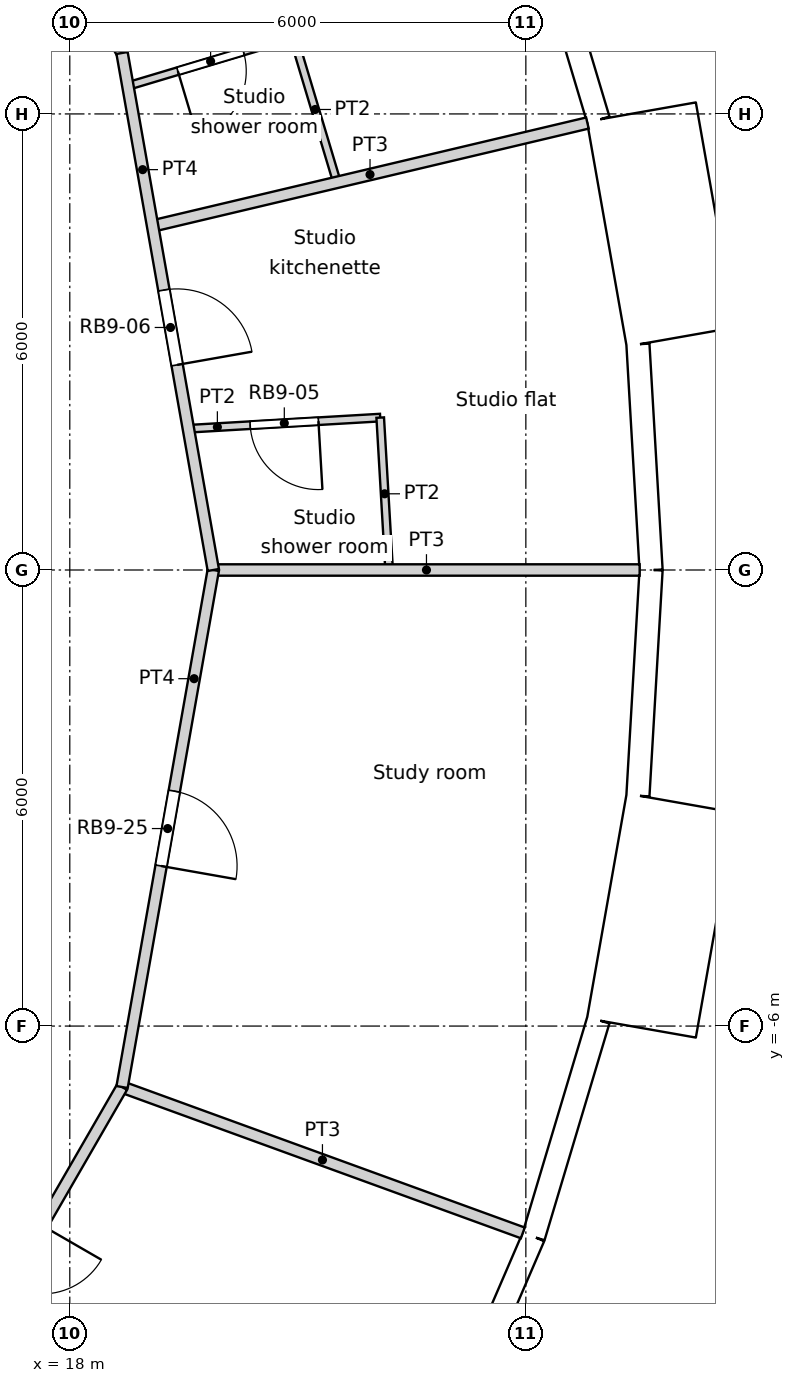
"""IFC4 building model, lengths in metres.
Left out: names, types, materials, properties, quantities, classifications, styles, units other than length and angle.
Written with IfcOpenShell. Run it as: python <this file> out.ifc"""

import sys

from ifc_helpers import new_model, si_unit, direction, frame, frame_2d, origin, origin_2d, place, context, subcontext, project, spatial, rectangle, circle, extrude, element, fill, save


model = new_model("IFC4")
c1 = context("Model", 3, precision=1e-05, world=origin(), true_north=direction((0.0, 1.0)))
c2 = subcontext(c1, "Body", "Model", "MODEL_VIEW")
j1 = project(units=[si_unit("LENGTHUNIT", "METRE"), si_unit("PLANEANGLEUNIT", "RADIAN")], contexts=[c1])
p1 = place(None, origin())
s1 = spatial("IfcSite", under=j1, at=p1, CompositionType="ELEMENT")
p2 = place(p1, origin())
s2 = spatial("IfcBuilding", under=s1, at=p2, CompositionType="ELEMENT")
p3 = place(p2, frame((0.0, 0.0, 212.4)))
s3 = spatial("IfcBuildingStorey", under=s2, at=p3, CompositionType="ELEMENT", Elevation=212.4)
for number, where, z_axis, x_axis in (
    (1, (24.548, 0.0, 0.0), (0.0, 0.0, 1.0), (1.0, 0.0, 0.0)),
    (2, (23.886, 5.661, 0.0), (0.0, 0.0, 1.0), (1.0, 0.0, 0.0)),
    (3, (23.886, -5.661, 0.0), (0.0, 0.0, 1.0), (1.0, 0.0, 0.0)),
):
    element("IfcColumn", number, at=place(p3, frame(where, z_axis=z_axis, x_axis=x_axis)), inside=s3, PredefinedType="COLUMN", context=c2, shape_type="SweptSolid", body=[
        extrude(circle(Radius=0.6, at=origin_2d()), origin(), (0.0, 0.0, 1.0), 3.6),
    ])
for number, where, z_axis, x_axis in (
    (4, (18.822, 0.0, 0.0), (0.0, 0.0, 1.0), (1.0, 0.0, 0.0)),
    (5, (17.986, 5.548, 0.0), (0.0, 0.0, 1.0), (1.0, 0.0, 0.0)),
    (6, (17.986, -5.548, 0.0), (0.0, 0.0, 1.0), (1.0, 0.0, 0.0)),
):
    element("IfcColumn", number, at=place(p3, frame(where, z_axis=z_axis, x_axis=x_axis)), inside=s3, PredefinedType="COLUMN", context=c2, shape_type="SweptSolid", body=[
        extrude(circle(Radius=0.65, at=origin_2d()), origin(), (0.0, 0.0, 1.0), 3.6),
    ])
p4 = place(p3, frame((25.647, 0.0, 0.0), z_axis=(0.0, 0.0, 1.0), x_axis=(-0.058144307138, 0.998308188661, 0.0)))
e7 = element("IfcWall", 7, at=p4, inside=s3, PredefinedType="SOLIDWALL", context=c2, shape_type="SweptSolid", body=[
    extrude(rectangle(XDim=2.973, YDim=0.3, at=frame_2d((1.486, 0.0))), origin(), (0.0, 0.0, 1.0), 3.3),
])
p5 = place(p4, frame((1.486, 0.0, 1.55)))
e8 = element("IfcOpeningElement", 8, at=p5, cuts=e7, PredefinedType="OPENING", context=c2, shape_type="SweptSolid", body=[
    extrude(circle(Radius=0.9, at=origin_2d()), frame((0.0, 0.16, 0.0), z_axis=(0.0, -1.0, 0.0), x_axis=(1.0, 0.0, 0.0)), (0.0, 0.0, 1.0), 0.32),
])
p6 = place(p3, frame((26.042, 3.069, -0.3), z_axis=(0.0, 0.0, 1.0), x_axis=(-0.173669267716, 0.984804034035, 0.0)))
e9 = element("IfcWall", 9, at=p6, inside=s3, PredefinedType="ELEMENTEDWALL", context=c2, shape_type="SweptSolid", body=[
    extrude(rectangle(XDim=3.0, YDim=1.45, at=frame_2d((1.5, 0.0))), origin(), (0.0, 0.0, 1.0), 3.6),
])
p7 = place(p6, frame((1.5, 0.0, 1.85)))
e10 = element("IfcOpeningElement", 10, at=p7, cuts=e9, PredefinedType="OPENING", context=c2, shape_type="SweptSolid", body=[
    extrude(circle(Radius=0.9, at=origin_2d()), frame((0.0, 0.735, 0.0), z_axis=(0.0, -1.0, 0.0), x_axis=(1.0, 0.0, 0.0)), (0.0, 0.0, 1.0), 1.47),
])
p8 = place(p3, frame((24.953, 5.924, 0.0), z_axis=(0.0, 0.0, 1.0), x_axis=(-0.286782750849, 0.957995643944, 0.0)))
e11 = element("IfcWall", 11, at=p8, inside=s3, PredefinedType="SOLIDWALL", context=c2, shape_type="SweptSolid", body=[
    extrude(rectangle(XDim=2.973, YDim=0.3, at=frame_2d((1.486, 0.0))), origin(), (0.0, 0.0, 1.0), 3.3),
])
p9 = place(p8, frame((1.486, 0.0, 1.55)))
e12 = element("IfcOpeningElement", 12, at=p9, cuts=e11, PredefinedType="OPENING", context=c2, shape_type="SweptSolid", body=[
    extrude(circle(Radius=0.9, at=origin_2d()), frame((0.0, 0.16, 0.0), z_axis=(0.0, -1.0, 0.0), x_axis=(1.0, 0.0, 0.0)), (0.0, 0.0, 1.0), 0.32),
])
p10 = place(p3, frame((22.923, -11.502, 0.0), z_axis=(0.0, 0.0, 1.0), x_axis=(0.396148129016, 0.918186614952, 0.0)))
e13 = element("IfcWall", 13, at=p10, inside=s3, PredefinedType="SOLIDWALL", context=c2, shape_type="SweptSolid", body=[
    extrude(rectangle(XDim=2.973, YDim=0.3, at=frame_2d((1.486, 0.0))), origin(), (0.0, 0.0, 1.0), 3.3),
])
p11 = place(p10, frame((1.486, 0.0, 1.55)))
e14 = element("IfcOpeningElement", 14, at=p11, cuts=e13, PredefinedType="OPENING", context=c2, shape_type="SweptSolid", body=[
    extrude(circle(Radius=0.9, at=origin_2d()), frame((0.0, 0.16, 0.0), z_axis=(0.0, -1.0, 0.0), x_axis=(1.0, 0.0, 0.0)), (0.0, 0.0, 1.0), 0.32),
])
p12 = place(p3, frame((24.101, -8.772, 0.0), z_axis=(0.0, 0.0, 1.0), x_axis=(0.286782750849, 0.957995643944, 0.0)))
e15 = element("IfcWall", 15, at=p12, inside=s3, PredefinedType="SOLIDWALL", context=c2, shape_type="SweptSolid", body=[
    extrude(rectangle(XDim=2.973, YDim=0.3, at=frame_2d((1.486, 0.0))), origin(), (0.0, 0.0, 1.0), 3.3),
])
p13 = place(p12, frame((1.486, 0.0, 1.55)))
e16 = element("IfcOpeningElement", 16, at=p13, cuts=e15, PredefinedType="OPENING", context=c2, shape_type="SweptSolid", body=[
    extrude(circle(Radius=0.9, at=origin_2d()), frame((0.0, 0.16, 0.0), z_axis=(0.0, -1.0, 0.0), x_axis=(1.0, 0.0, 0.0)), (0.0, 0.0, 1.0), 0.32),
])
p14 = place(p3, frame((25.521, -6.023, -0.3), z_axis=(0.0, 0.0, 1.0), x_axis=(0.173669267716, 0.984804034035, 0.0)))
e17 = element("IfcWall", 17, at=p14, inside=s3, PredefinedType="ELEMENTEDWALL", context=c2, shape_type="SweptSolid", body=[
    extrude(rectangle(XDim=3.0, YDim=1.45, at=frame_2d((1.5, 0.0))), origin(), (0.0, 0.0, 1.0), 3.6),
])
p15 = place(p14, frame((1.5, 0.0, 1.85)))
e18 = element("IfcOpeningElement", 18, at=p15, cuts=e17, PredefinedType="OPENING", context=c2, shape_type="SweptSolid", body=[
    extrude(circle(Radius=0.9, at=origin_2d()), frame((0.0, 0.735, 0.0), z_axis=(0.0, -1.0, 0.0), x_axis=(1.0, 0.0, 0.0)), (0.0, 0.0, 1.0), 1.47),
])
p16 = place(p3, frame((25.475, -2.968, 0.0), z_axis=(0.0, 0.0, 1.0), x_axis=(0.058144307138, 0.998308188661, 0.0)))
e19 = element("IfcWall", 19, at=p16, inside=s3, PredefinedType="SOLIDWALL", context=c2, shape_type="SweptSolid", body=[
    extrude(rectangle(XDim=2.973, YDim=0.3, at=frame_2d((1.486, 0.0))), origin(), (0.0, 0.0, 1.0), 3.3),
])
p17 = place(p16, frame((1.486, 0.0, 1.55)))
e20 = element("IfcOpeningElement", 20, at=p17, cuts=e19, PredefinedType="OPENING", context=c2, shape_type="SweptSolid", body=[
    extrude(circle(Radius=0.9, at=origin_2d()), frame((0.0, 0.16, 0.0), z_axis=(0.0, -1.0, 0.0), x_axis=(1.0, 0.0, 0.0)), (0.0, 0.0, 1.0), 0.32),
])
p18 = place(p3, frame((18.688, 6.802, 0.0), z_axis=(0.0, 0.0, 1.0), x_axis=(0.173831710537, -0.984775373581, 0.0)))
e21 = element("IfcWall", 21, at=p18, inside=s3, PredefinedType="PARTITIONING", context=c2, shape_type="SweptSolid", body=[
    extrude(rectangle(XDim=6.907, YDim=0.15, at=frame_2d((3.454, 0.0))), origin(), (0.0, 0.0, 1.0), 3.15),
])
p19 = place(p18, frame((3.167, 0.0, 0.0)))
e22 = element("IfcOpeningElement", 22, at=p19, cuts=e21, PredefinedType="OPENING", context=c2, shape_type="SweptSolid", body=[
    extrude(rectangle(XDim=1.0, YDim=2.1, at=frame_2d((0.5, 1.05))), frame((0.0, 0.075, 0.0), z_axis=(0.0, -1.0, 0.0), x_axis=(1.0, 0.0, 0.0)), (0.0, 0.0, 1.0), 0.15),
])
p20 = place(p3, frame((15.235, 12.784, 0.0), z_axis=(0.0, 0.0, 1.0), x_axis=(0.499940714931, -0.86605962933, 0.0)))
e23 = element("IfcWall", 23, at=p20, inside=s3, PredefinedType="PARTITIONING", context=c2, shape_type="SweptSolid", body=[
    extrude(rectangle(XDim=6.907, YDim=0.15, at=frame_2d((3.454, 0.0))), origin(), (0.0, 0.0, 1.0), 3.15),
])
p21 = place(p20, frame((5.249, 0.0, 0.0)))
e24 = element("IfcOpeningElement", 24, at=p21, cuts=e23, PredefinedType="OPENING", context=c2, shape_type="SweptSolid", body=[
    extrude(rectangle(XDim=1.0, YDim=2.1, at=frame_2d((0.5, 1.05))), frame((0.0, 0.075, 0.0), z_axis=(0.0, -1.0, 0.0), x_axis=(1.0, 0.0, 0.0)), (0.0, 0.0, 1.0), 0.15),
])
p22 = place(p20, frame((3.041, 0.0, 0.0)))
e25 = element("IfcOpeningElement", 25, at=p22, cuts=e23, PredefinedType="OPENING", context=c2, shape_type="SweptSolid", body=[
    extrude(rectangle(XDim=1.0, YDim=2.1, at=frame_2d((0.5, 1.05))), frame((0.0, 0.075, 0.0), z_axis=(0.0, -1.0, 0.0), x_axis=(1.0, 0.0, 0.0)), (0.0, 0.0, 1.0), 0.15),
])
p23 = place(p3, frame((15.235, -12.784, 0.0), z_axis=(0.0, 0.0, 1.0), x_axis=(0.499914202267, 0.866074933462, 0.0)))
e26 = element("IfcWall", 26, at=p23, inside=s3, PredefinedType="PARTITIONING", context=c2, shape_type="SweptSolid", body=[
    extrude(rectangle(XDim=6.907, YDim=0.15, at=frame_2d((3.454, 0.0))), origin(), (0.0, 0.0, 1.0), 3.15),
])
p24 = place(p23, frame((3.003, 0.0, 0.0)))
e27 = element("IfcOpeningElement", 27, at=p24, cuts=e26, PredefinedType="OPENING", context=c2, shape_type="SweptSolid", body=[
    extrude(rectangle(XDim=1.8, YDim=2.1, at=frame_2d((0.9, 1.05))), frame((0.0, 0.075, 0.0), z_axis=(0.0, -1.0, 0.0), x_axis=(1.0, 0.0, 0.0)), (0.0, 0.0, 1.0), 0.15),
])
p25 = place(p3, frame((18.688, -6.802, 0.0), z_axis=(0.0, 0.0, 1.0), x_axis=(0.173728873845, 0.98479352069, 0.0)))
e28 = element("IfcWall", 28, at=p25, inside=s3, PredefinedType="PARTITIONING", context=c2, shape_type="SweptSolid", body=[
    extrude(rectangle(XDim=6.907, YDim=0.15, at=frame_2d((3.454, 0.0))), origin(), (0.0, 0.0, 1.0), 3.15),
])
p26 = place(p25, frame((2.953, 0.0, 0.0)))
e29 = element("IfcOpeningElement", 29, at=p26, cuts=e28, PredefinedType="OPENING", context=c2, shape_type="SweptSolid", body=[
    extrude(rectangle(XDim=1.0, YDim=2.04, at=frame_2d((0.5, 1.02))), frame((0.0, 0.075, 0.0), z_axis=(0.0, -1.0, 0.0), x_axis=(1.0, 0.0, 0.0)), (0.0, 0.0, 1.0), 0.15),
])
p27 = place(p3, frame((22.084, 2.005, 0.0), z_axis=(0.0, 0.0, 1.0), x_axis=(0.058230299749, -0.998303176491, 0.0)))
e30 = element("IfcWall", 30, at=p27, inside=s3, PredefinedType="PARTITIONING", context=c2, shape_type="SweptSolid", body=[
    extrude(rectangle(XDim=2.008, YDim=0.1, at=frame_2d((1.004, 0.0))), origin(), (0.0, 0.0, 1.0), 3.15),
])
p28 = place(p3, frame((19.56, 1.858, 0.0), z_axis=(0.0, 0.0, 1.0), x_axis=(0.998308830473, 0.05813328651, 0.0)))
e31 = element("IfcWall", 31, at=p28, inside=s3, PredefinedType="PARTITIONING", context=c2, shape_type="SweptSolid", body=[
    extrude(rectangle(XDim=2.528, YDim=0.1, at=frame_2d((1.264, 0.0))), origin(), (0.0, 0.0, 1.0), 3.15),
])
p29 = place(p28, frame((0.814, 0.0, 0.0)))
e32 = element("IfcOpeningElement", 32, at=p29, cuts=e31, PredefinedType="OPENING", context=c2, shape_type="SweptSolid", body=[
    extrude(rectangle(XDim=0.9, YDim=2.04, at=frame_2d((0.45, 1.02))), frame((0.0, 0.05, 0.0), z_axis=(0.0, -1.0, 0.0), x_axis=(1.0, 0.0, 0.0)), (0.0, 0.0, 1.0), 0.1),
])
p30 = place(p3, frame((19.09, 4.525, 0.0), z_axis=(0.0, 0.0, 1.0), x_axis=(0.973093766115, 0.230409466707, 0.0)))
e33 = element("IfcWall", 33, at=p30, inside=s3, PredefinedType="PARTITIONING", context=c2, shape_type="SweptSolid", body=[
    extrude(rectangle(XDim=5.879, YDim=0.15, at=frame_2d((2.939, 0.0))), origin(), (0.0, 0.0, 1.0), 3.15),
])
p31 = place(p3, frame((19.888, 0.0, 0.0), z_axis=(0.0, 0.0, 1.0), x_axis=(1.0, 0.0, 0.0)))
e34 = element("IfcWall", 34, at=p31, inside=s3, PredefinedType="PARTITIONING", context=c2, shape_type="SweptSolid", body=[
    extrude(rectangle(XDim=5.609, YDim=0.15, at=frame_2d((2.805, 0.0))), origin(), (0.0, 0.0, 1.0), 3.15),
])
p32 = place(p3, frame((20.941, 7.018, 0.0), z_axis=(0.0, 0.0, 1.0), x_axis=(0.287124264191, -0.957893343182, 0.0)))
e35 = element("IfcWall", 35, at=p32, inside=s3, PredefinedType="PARTITIONING", context=c2, shape_type="SweptSolid", body=[
    extrude(rectangle(XDim=2.003, YDim=0.1, at=frame_2d((1.002, 0.0))), origin(), (0.0, 0.0, 1.0), 3.15),
])
p33 = place(p3, frame((18.765, 6.367, 0.0), z_axis=(0.0, 0.0, 1.0), x_axis=(0.958030169919, 0.286667391807, 0.0)))
e36 = element("IfcWall", 36, at=p33, inside=s3, PredefinedType="PARTITIONING", context=c2, shape_type="SweptSolid", body=[
    extrude(rectangle(XDim=2.271, YDim=0.1, at=frame_2d((1.136, 0.0))), origin(), (0.0, 0.0, 1.0), 3.15),
])
p34 = place(p33, frame((0.685, 0.0, 0.0)))
e37 = element("IfcOpeningElement", 37, at=p34, cuts=e36, PredefinedType="OPENING", context=c2, shape_type="SweptSolid", body=[
    extrude(rectangle(XDim=0.9, YDim=2.04, at=frame_2d((0.45, 1.02))), frame((0.0, 0.05, 0.0), z_axis=(0.0, -1.0, 0.0), x_axis=(1.0, 0.0, 0.0)), (0.0, 0.0, 1.0), 0.1),
])
p35 = place(p3, frame((18.688, -6.802, 0.0), z_axis=(0.0, 0.0, 1.0), x_axis=(0.939686652043, -0.342036541866, 0.0)))
e38 = element("IfcWall", 38, at=p35, inside=s3, PredefinedType="PARTITIONING", context=c2, shape_type="SweptSolid", body=[
    extrude(rectangle(XDim=5.61, YDim=0.15, at=frame_2d((2.805, 0.0))), origin(), (0.0, 0.0, 1.0), 3.15),
])
p36 = place(p5, origin())
e39 = element("IfcWindow", 39, at=p36, inside=s3, PartitioningType="SINGLE_PANEL", PredefinedType="WINDOW", context=c2, shape_type="SweptSolid", body=[
    extrude(circle(Radius=0.9, at=origin_2d()), frame((0.0, 0.12, 0.0), z_axis=(0.0, -1.0, 0.0), x_axis=(1.0, 0.0, 0.0)), (0.0, 0.0, 1.0), 0.1),
])
fill(e8, e39)
p37 = place(p7, origin())
e40 = element("IfcWindow", 40, at=p37, inside=s3, PartitioningType="SINGLE_PANEL", PredefinedType="WINDOW", context=c2, shape_type="SweptSolid", body=[
    extrude(circle(Radius=0.9, at=origin_2d()), frame((0.0, 0.695, 0.0), z_axis=(0.0, -1.0, 0.0), x_axis=(1.0, 0.0, 0.0)), (0.0, 0.0, 1.0), 0.1),
])
fill(e10, e40)
p38 = place(p9, origin())
e41 = element("IfcWindow", 41, at=p38, inside=s3, PartitioningType="SINGLE_PANEL", PredefinedType="WINDOW", context=c2, shape_type="SweptSolid", body=[
    extrude(circle(Radius=0.9, at=origin_2d()), frame((0.0, 0.12, 0.0), z_axis=(0.0, -1.0, 0.0), x_axis=(1.0, 0.0, 0.0)), (0.0, 0.0, 1.0), 0.1),
])
fill(e12, e41)
p39 = place(p11, origin())
e42 = element("IfcWindow", 42, at=p39, inside=s3, PartitioningType="SINGLE_PANEL", PredefinedType="WINDOW", context=c2, shape_type="SweptSolid", body=[
    extrude(circle(Radius=0.9, at=origin_2d()), frame((0.0, 0.12, 0.0), z_axis=(0.0, -1.0, 0.0), x_axis=(1.0, 0.0, 0.0)), (0.0, 0.0, 1.0), 0.1),
])
fill(e14, e42)
p40 = place(p13, origin())
e43 = element("IfcWindow", 43, at=p40, inside=s3, PartitioningType="SINGLE_PANEL", PredefinedType="WINDOW", context=c2, shape_type="SweptSolid", body=[
    extrude(circle(Radius=0.9, at=origin_2d()), frame((0.0, 0.12, 0.0), z_axis=(0.0, -1.0, 0.0), x_axis=(1.0, 0.0, 0.0)), (0.0, 0.0, 1.0), 0.1),
])
fill(e16, e43)
p41 = place(p15, origin())
e44 = element("IfcWindow", 44, at=p41, inside=s3, PartitioningType="SINGLE_PANEL", PredefinedType="WINDOW", context=c2, shape_type="SweptSolid", body=[
    extrude(circle(Radius=0.9, at=origin_2d()), frame((0.0, 0.695, 0.0), z_axis=(0.0, -1.0, 0.0), x_axis=(1.0, 0.0, 0.0)), (0.0, 0.0, 1.0), 0.1),
])
fill(e18, e44)
p42 = place(p17, origin())
e45 = element("IfcWindow", 45, at=p42, inside=s3, PartitioningType="SINGLE_PANEL", PredefinedType="WINDOW", context=c2, shape_type="SweptSolid", body=[
    extrude(circle(Radius=0.9, at=origin_2d()), frame((0.0, 0.12, 0.0), z_axis=(0.0, -1.0, 0.0), x_axis=(1.0, 0.0, 0.0)), (0.0, 0.0, 1.0), 0.1),
])
fill(e20, e45)
p43 = place(p29, origin())
e46 = element("IfcDoor", 46, at=p43, inside=s3, OperationType="SINGLE_SWING_LEFT", PredefinedType="DOOR", context=c2, shape_type="SweptSolid", body=[
    extrude(rectangle(XDim=0.9, YDim=2.04, at=frame_2d((0.45, 1.02))), frame((0.0, 0.025, 0.0), z_axis=(0.0, -1.0, 0.0), x_axis=(1.0, 0.0, 0.0)), (0.0, 0.0, 1.0), 0.05),
])
fill(e32, e46)
p44 = place(p19, origin())
e47 = element("IfcDoor", 47, at=p44, inside=s3, OperationType="SINGLE_SWING_RIGHT", PredefinedType="DOOR", context=c2, shape_type="SweptSolid", body=[
    extrude(rectangle(XDim=1.0, YDim=2.1, at=frame_2d((0.5, 1.05))), frame((0.0, 0.025, 0.0), z_axis=(0.0, -1.0, 0.0), x_axis=(1.0, 0.0, 0.0)), (0.0, 0.0, 1.0), 0.05),
])
fill(e22, e47)
p45 = place(p34, origin())
e48 = element("IfcDoor", 48, at=p45, inside=s3, OperationType="SINGLE_SWING_RIGHT", PredefinedType="DOOR", context=c2, shape_type="SweptSolid", body=[
    extrude(rectangle(XDim=0.9, YDim=2.04, at=frame_2d((0.45, 1.02))), frame((0.0, 0.025, 0.0), z_axis=(0.0, -1.0, 0.0), x_axis=(1.0, 0.0, 0.0)), (0.0, 0.0, 1.0), 0.05),
])
fill(e37, e48)
p46 = place(p26, origin())
e49 = element("IfcDoor", 49, at=p46, inside=s3, OperationType="SINGLE_SWING_RIGHT", PredefinedType="DOOR", context=c2, shape_type="SweptSolid", body=[
    extrude(rectangle(XDim=1.0, YDim=2.04, at=frame_2d((0.5, 1.02))), frame((0.0, 0.025, 0.0), z_axis=(0.0, -1.0, 0.0), x_axis=(1.0, 0.0, 0.0)), (0.0, 0.0, 1.0), 0.05),
])
fill(e29, e49)
save(model, sys.argv[1])
